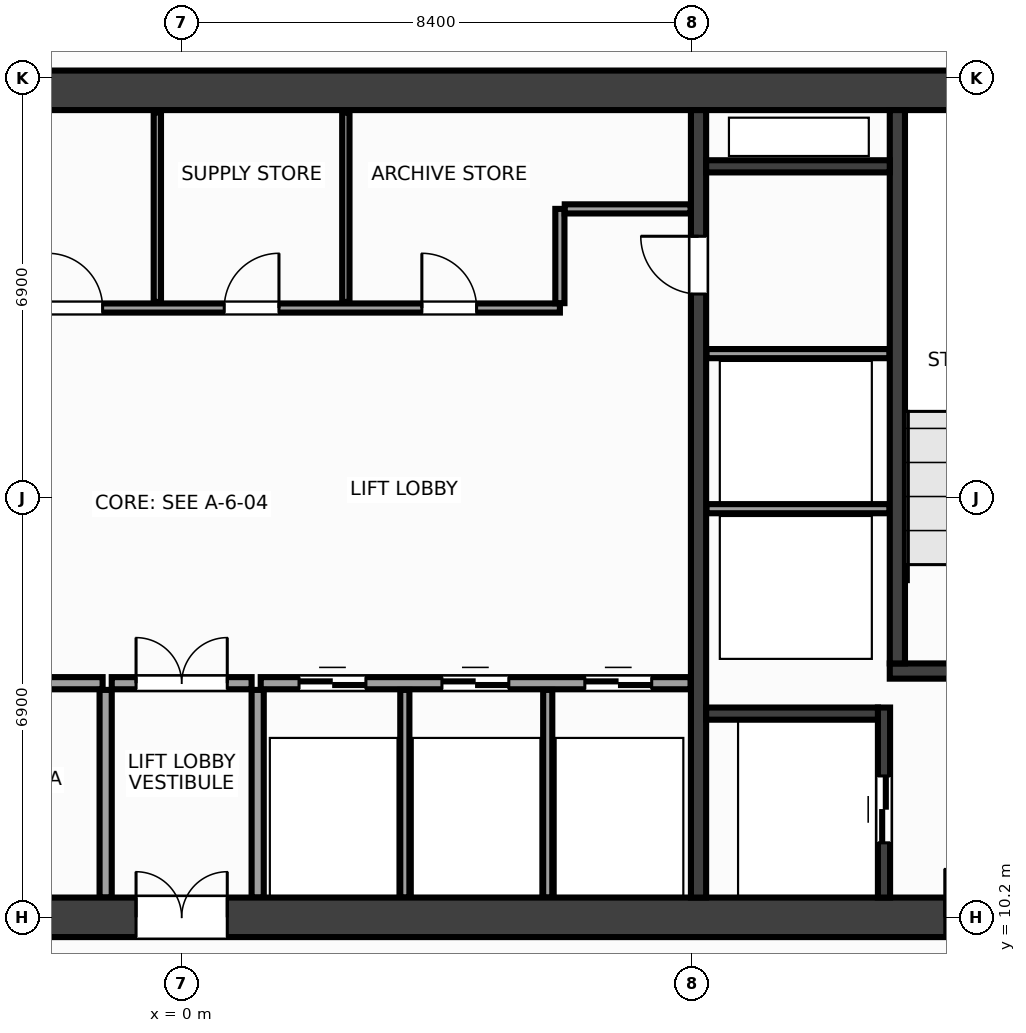
"""IFC4 building model, lengths in metres.
Left out: names, types, materials, properties, quantities, classifications, styles, units other than length and angle.
Written with IfcOpenShell. Run it as: python <this file> out.ifc"""

import sys

from ifc_helpers import new_model, si_unit, direction, frame, frame_2d, origin, place, context, subcontext, project, spatial, rectangle, extrude, source, transform, mapped, element, fill, save


model = new_model("IFC4")
c1 = context("Model", 3, precision=1e-05, world=origin(), true_north=direction((0.0, 1.0)))
c2 = subcontext(c1, "Body", "Model", "MODEL_VIEW")
j1 = project(units=[si_unit("LENGTHUNIT", "METRE"), si_unit("PLANEANGLEUNIT", "RADIAN")], contexts=[c1])
p1 = place(None, origin())
s1 = spatial("IfcSite", under=j1, at=p1, CompositionType="ELEMENT")
p2 = place(p1, origin())
s2 = spatial("IfcBuilding", under=s1, at=p2, CompositionType="ELEMENT")
p3 = place(p2, frame((0.0, 0.0, 92.0)))
s3 = spatial("IfcBuildingStorey", under=s2, at=p3, CompositionType="ELEMENT", Elevation=92.0)
m1 = source(origin(), c2, "Body", "SweptSolid", [
    extrude(rectangle(XDim=31.85, YDim=0.65, at=frame_2d((15.925, 0.0))), origin(), (0.0, 0.0, 1.0), 3.6),
])
p4 = place(p3, frame((-15.925, 23.8, 0.0), z_axis=(0.0, 0.0, 1.0), x_axis=(1.0, 0.0, 0.0)))
e1 = element("IfcWall", 1, at=p4, inside=s3, PredefinedType="SHEAR", context=c2, shape_type="MappedRepresentation", body=[
    mapped(m1, transform((0.0, 0.0, 0.0), x_axis=(1.0, 0.0, 0.0), y_axis=(0.0, 1.0, 0.0), z_axis=(0.0, 0.0, 1.0), scale=1.0)),
])
p5 = place(p3, frame((-15.925, 10.2, 0.0), z_axis=(0.0, 0.0, 1.0), x_axis=(1.0, 0.0, 0.0)))
e2 = element("IfcWall", 2, at=p5, inside=s3, PredefinedType="SHEAR", context=c2, shape_type="MappedRepresentation", body=[
    mapped(m1, transform((0.0, 0.0, 0.0), x_axis=(1.0, 0.0, 0.0), y_axis=(0.0, 1.0, 0.0), z_axis=(0.0, 0.0, 1.0), scale=1.0)),
])
p6 = place(p5, frame((1.775, 0.0, 0.0)))
e3 = element("IfcOpeningElement", 3, at=p6, cuts=e2, PredefinedType="OPENING", context=c2, shape_type="SweptSolid", body=[
    extrude(rectangle(XDim=1.6, YDim=2.15, at=frame_2d((0.8, 1.075))), frame((0.0, 0.337, 0.0), z_axis=(0.0, -1.0, 0.0), x_axis=(1.0, 0.0, 0.0)), (0.0, 0.0, 1.0), 0.674),
])
p7 = place(p5, frame((28.475, 0.0, 0.0)))
e4 = element("IfcOpeningElement", 4, at=p7, cuts=e2, PredefinedType="OPENING", context=c2, shape_type="SweptSolid", body=[
    extrude(rectangle(XDim=1.6, YDim=2.15, at=frame_2d((0.8, 1.075))), frame((0.0, 0.337, 0.0), z_axis=(0.0, -1.0, 0.0), x_axis=(1.0, 0.0, 0.0)), (0.0, 0.0, 1.0), 0.674),
])
p8 = place(p5, frame((15.175, 0.0, 0.0)))
e5 = element("IfcOpeningElement", 5, at=p8, cuts=e2, PredefinedType="OPENING", context=c2, shape_type="SweptSolid", body=[
    extrude(rectangle(XDim=1.5, YDim=2.2, at=frame_2d((0.75, 1.1))), frame((0.0, 0.337, 0.0), z_axis=(0.0, -1.0, 0.0), x_axis=(1.0, 0.0, 0.0)), (0.0, 0.0, 1.0), 0.674),
])
m2 = source(origin(), c2, "Body", "SweptSolid", [
    extrude(rectangle(XDim=12.95, YDim=0.25, at=frame_2d((6.475, 0.0))), origin(), (0.0, 0.0, 1.0), 3.6),
])
p9 = place(p3, frame((8.5, 10.525, 0.0), z_axis=(0.0, 0.0, 1.0), x_axis=(0.0, 1.0, 0.0)))
e6 = element("IfcWall", 6, at=p9, inside=s3, PredefinedType="SHEAR", context=c2, shape_type="MappedRepresentation", body=[
    mapped(m2, transform((0.0, 0.0, 0.0), x_axis=(1.0, 0.0, 0.0), y_axis=(0.0, 1.0, 0.0), z_axis=(0.0, 0.0, 1.0), scale=1.0)),
])
p10 = place(p9, frame((9.925, 0.0, 0.0)))
e7 = element("IfcOpeningElement", 7, at=p10, cuts=e6, PredefinedType="OPENING", context=c2, shape_type="SweptSolid", body=[
    extrude(rectangle(XDim=0.95, YDim=2.15, at=frame_2d((0.475, 1.075))), frame((0.0, 0.137, 0.0), z_axis=(0.0, -1.0, 0.0), x_axis=(1.0, 0.0, 0.0)), (0.0, 0.0, 1.0), 0.274),
])
m3 = source(origin(), c2, "Body", "SweptSolid", [
    extrude(rectangle(XDim=3.63, YDim=0.25, at=frame_2d((1.815, 0.0))), origin(), (0.0, 0.0, 1.0), 3.6),
])
p11 = place(p3, frame((11.645, 14.25, 0.0), z_axis=(0.0, 0.0, 1.0), x_axis=(1.0, 0.0, 0.0)))
e8 = element("IfcWall", 8, at=p11, inside=s3, PredefinedType="SHEAR", context=c2, shape_type="MappedRepresentation", body=[
    mapped(m3, transform((0.0, 0.0, 0.0), x_axis=(1.0, 0.0, 0.0), y_axis=(0.0, 1.0, 0.0), z_axis=(0.0, 0.0, 1.0), scale=1.0)),
])
p12 = place(p11, frame((0.95, 0.0, 0.0)))
e9 = element("IfcOpeningElement", 9, at=p12, cuts=e8, PredefinedType="OPENING", context=c2, shape_type="SweptSolid", body=[
    extrude(rectangle(XDim=1.6, YDim=2.15, at=frame_2d((0.8, 1.075))), frame((0.0, 0.137, 0.0), z_axis=(0.0, -1.0, 0.0), x_axis=(1.0, 0.0, 0.0)), (0.0, 0.0, 1.0), 0.274),
])
m4 = source(origin(), c2, "Body", "SweptSolid", [
    extrude(rectangle(XDim=9.1, YDim=0.25, at=frame_2d((4.55, 0.0))), origin(), (0.0, 0.0, 1.0), 3.6),
])
p13 = place(p3, frame((11.77, 14.375, 0.0), z_axis=(0.0, 0.0, 1.0), x_axis=(0.0, 1.0, 0.0)))
e10 = element("IfcWall", 10, at=p13, inside=s3, PredefinedType="SHEAR", context=c2, shape_type="MappedRepresentation", body=[
    mapped(m4, transform((0.0, 0.0, 0.0), x_axis=(1.0, 0.0, 0.0), y_axis=(0.0, 1.0, 0.0), z_axis=(0.0, 0.0, 1.0), scale=1.0)),
])
m5 = source(origin(), c2, "Body", "SweptSolid", [
    extrude(rectangle(XDim=3.125, YDim=0.2, at=frame_2d((1.562, 0.0))), origin(), (0.0, 0.0, 1.0), 3.6),
])
p14 = place(p3, frame((11.55, 10.525, 0.0), z_axis=(0.0, 0.0, 1.0), x_axis=(0.0, 1.0, 0.0)))
e11 = element("IfcWall", 11, at=p14, inside=s3, PredefinedType="SHEAR", context=c2, shape_type="MappedRepresentation", body=[
    mapped(m5, transform((0.0, 0.0, 0.0), x_axis=(1.0, 0.0, 0.0), y_axis=(0.0, 1.0, 0.0), z_axis=(0.0, 0.0, 1.0), scale=1.0)),
])
p15 = place(p14, frame((0.9, 0.0, 0.0)))
e12 = element("IfcOpeningElement", 12, at=p15, cuts=e11, PredefinedType="OPENING", context=c2, shape_type="SweptSolid", body=[
    extrude(rectangle(XDim=1.1, YDim=2.15, at=frame_2d((0.55, 1.075))), frame((0.0, 0.112, 0.0), z_axis=(0.0, -1.0, 0.0), x_axis=(1.0, 0.0, 0.0)), (0.0, 0.0, 1.0), 0.224),
])
m6 = source(origin(), c2, "Body", "SweptSolid", [
    extrude(rectangle(XDim=2.825, YDim=0.2, at=frame_2d((1.413, 0.0))), origin(), (0.0, 0.0, 1.0), 3.6),
])
p16 = place(p3, frame((8.625, 13.55, 0.0), z_axis=(0.0, 0.0, 1.0), x_axis=(1.0, 0.0, 0.0)))
e13 = element("IfcWall", 13, at=p16, inside=s3, PredefinedType="SHEAR", context=c2, shape_type="MappedRepresentation", body=[
    mapped(m6, transform((0.0, 0.0, 0.0), x_axis=(1.0, 0.0, 0.0), y_axis=(0.0, 1.0, 0.0), z_axis=(0.0, 0.0, 1.0), scale=1.0)),
])
m7 = source(origin(), c2, "Body", "SweptSolid", [
    extrude(rectangle(XDim=3.02, YDim=0.2, at=frame_2d((1.51, 0.0))), origin(), (0.0, 0.0, 1.0), 3.6),
])
p17 = place(p3, frame((8.625, 22.55, 0.0), z_axis=(0.0, 0.0, 1.0), x_axis=(1.0, 0.0, 0.0)))
e14 = element("IfcWall", 14, at=p17, inside=s3, PredefinedType="SHEAR", context=c2, shape_type="MappedRepresentation", body=[
    mapped(m7, transform((0.0, 0.0, 0.0), x_axis=(1.0, 0.0, 0.0), y_axis=(0.0, 1.0, 0.0), z_axis=(0.0, 0.0, 1.0), scale=1.0)),
])
m8 = source(origin(), c2, "Body", "SweptSolid", [
    extrude(rectangle(XDim=3.01, YDim=0.15, at=frame_2d((1.505, 0.0))), origin(), (0.0, 0.0, 1.0), 3.36),
])
for number, where, z_axis, x_axis in (
    (15, (8.63, 16.92, 0.0), (0.0, 0.0, 1.0), (1.0, 0.0, 0.0)),
    (16, (8.63, 19.47, 0.0), (0.0, 0.0, 1.0), (1.0, 0.0, 0.0)),
):
    element("IfcWall", number, at=place(p3, frame(where, z_axis=z_axis, x_axis=x_axis)), inside=s3, PredefinedType="PARTITIONING", context=c2, shape_type="MappedRepresentation", body=[
        mapped(m8, transform((0.0, 0.0, 0.0), x_axis=(1.0, 0.0, 0.0), y_axis=(0.0, 1.0, 0.0), z_axis=(0.0, 0.0, 1.0), scale=1.0)),
    ])
m9 = source(origin(), c2, "Body", "SweptSolid", [
    extrude(rectangle(XDim=7.07, YDim=0.2, at=frame_2d((3.535, 0.0))), origin(), (0.0, 0.0, 1.0), 3.36),
])
p18 = place(p3, frame((-8.37, 14.05, 0.0), z_axis=(0.0, 0.0, 1.0), x_axis=(1.0, 0.0, 0.0)))
e17 = element("IfcWall", 17, at=p18, inside=s3, PredefinedType="PARTITIONING", context=c2, shape_type="MappedRepresentation", body=[
    mapped(m9, transform((0.0, 0.0, 0.0), x_axis=(1.0, 0.0, 0.0), y_axis=(0.0, 1.0, 0.0), z_axis=(0.0, 0.0, 1.0), scale=1.0)),
])
p19 = place(p18, frame((1.06, 0.0, 0.0)))
e18 = element("IfcOpeningElement", 18, at=p19, cuts=e17, PredefinedType="OPENING", context=c2, shape_type="SweptSolid", body=[
    extrude(rectangle(XDim=0.9, YDim=2.15, at=frame_2d((0.45, 1.075))), frame((0.0, 0.112, 0.0), z_axis=(0.0, -1.0, 0.0), x_axis=(1.0, 0.0, 0.0)), (0.0, 0.0, 1.0), 0.224),
])
p20 = place(p18, frame((4.51, 0.0, 0.0)))
e19 = element("IfcOpeningElement", 19, at=p20, cuts=e17, PredefinedType="OPENING", context=c2, shape_type="SweptSolid", body=[
    extrude(rectangle(XDim=0.9, YDim=2.15, at=frame_2d((0.45, 1.075))), frame((0.0, 0.112, 0.0), z_axis=(0.0, -1.0, 0.0), x_axis=(1.0, 0.0, 0.0)), (0.0, 0.0, 1.0), 0.224),
])
p21 = place(p3, frame((1.3, 14.05, 0.0), z_axis=(0.0, 0.0, 1.0), x_axis=(1.0, 0.0, 0.0)))
e20 = element("IfcWall", 20, at=p21, inside=s3, PredefinedType="PARTITIONING", context=c2, shape_type="MappedRepresentation", body=[
    mapped(m9, transform((0.0, 0.0, 0.0), x_axis=(1.0, 0.0, 0.0), y_axis=(0.0, 1.0, 0.0), z_axis=(0.0, 0.0, 1.0), scale=1.0)),
])
p22 = place(p21, frame((0.63, 0.0, 0.0)))
e21 = element("IfcOpeningElement", 21, at=p22, cuts=e20, PredefinedType="OPENING", context=c2, shape_type="SweptSolid", body=[
    extrude(rectangle(XDim=1.1, YDim=2.15, at=frame_2d((0.55, 1.075))), frame((0.0, 0.112, 0.0), z_axis=(0.0, -1.0, 0.0), x_axis=(1.0, 0.0, 0.0)), (0.0, 0.0, 1.0), 0.224),
])
p23 = place(p21, frame((2.98, 0.0, 0.0)))
e22 = element("IfcOpeningElement", 22, at=p23, cuts=e20, PredefinedType="OPENING", context=c2, shape_type="SweptSolid", body=[
    extrude(rectangle(XDim=1.1, YDim=2.15, at=frame_2d((0.55, 1.075))), frame((0.0, 0.112, 0.0), z_axis=(0.0, -1.0, 0.0), x_axis=(1.0, 0.0, 0.0)), (0.0, 0.0, 1.0), 0.224),
])
p24 = place(p21, frame((5.33, 0.0, 0.0)))
e23 = element("IfcOpeningElement", 23, at=p24, cuts=e20, PredefinedType="OPENING", context=c2, shape_type="SweptSolid", body=[
    extrude(rectangle(XDim=1.1, YDim=2.15, at=frame_2d((0.55, 1.075))), frame((0.0, 0.112, 0.0), z_axis=(0.0, -1.0, 0.0), x_axis=(1.0, 0.0, 0.0)), (0.0, 0.0, 1.0), 0.224),
])
m10 = source(origin(), c2, "Body", "SweptSolid", [
    extrude(rectangle(XDim=3.415, YDim=0.2, at=frame_2d((1.708, 0.0))), origin(), (0.0, 0.0, 1.0), 3.36),
])
for number, where, z_axis, x_axis in (
    (24, (-1.25, 10.525, 0.0), (0.0, 0.0, 1.0), (0.0, 1.0, 0.0)),
    (25, (1.25, 10.525, 0.0), (0.0, 0.0, 1.0), (0.0, 1.0, 0.0)),
):
    element("IfcWall", number, at=place(p3, frame(where, z_axis=z_axis, x_axis=x_axis)), inside=s3, PredefinedType="PARTITIONING", context=c2, shape_type="MappedRepresentation", body=[
        mapped(m10, transform((0.0, 0.0, 0.0), x_axis=(1.0, 0.0, 0.0), y_axis=(0.0, 1.0, 0.0), z_axis=(0.0, 0.0, 1.0), scale=1.0)),
    ])
m11 = source(origin(), c2, "Body", "SweptSolid", [
    extrude(rectangle(XDim=2.3, YDim=0.2, at=frame_2d((1.15, 0.0))), origin(), (0.0, 0.0, 1.0), 3.36),
])
p25 = place(p3, frame((-1.15, 14.05, 0.0), z_axis=(0.0, 0.0, 1.0), x_axis=(1.0, 0.0, 0.0)))
e26 = element("IfcWall", 26, at=p25, inside=s3, PredefinedType="PARTITIONING", context=c2, shape_type="MappedRepresentation", body=[
    mapped(m11, transform((0.0, 0.0, 0.0), x_axis=(1.0, 0.0, 0.0), y_axis=(0.0, 1.0, 0.0), z_axis=(0.0, 0.0, 1.0), scale=1.0)),
])
p26 = place(p25, frame((0.4, 0.0, 0.0)))
e27 = element("IfcOpeningElement", 27, at=p26, cuts=e26, PredefinedType="OPENING", context=c2, shape_type="SweptSolid", body=[
    extrude(rectangle(XDim=1.5, YDim=2.2, at=frame_2d((0.75, 1.1))), frame((0.0, 0.112, 0.0), z_axis=(0.0, -1.0, 0.0), x_axis=(1.0, 0.0, 0.0)), (0.0, 0.0, 1.0), 0.224),
])
m12 = source(origin(), c2, "Body", "SweptSolid", [
    extrude(rectangle(XDim=14.59, YDim=0.15, at=frame_2d((7.295, 0.0))), origin(), (0.0, 0.0, 1.0), 3.36),
])
p27 = place(p3, frame((-8.37, 20.22, 0.0), z_axis=(0.0, 0.0, 1.0), x_axis=(1.0, 0.0, 0.0)))
e28 = element("IfcWall", 28, at=p27, inside=s3, PredefinedType="PARTITIONING", context=c2, shape_type="MappedRepresentation", body=[
    mapped(m12, transform((0.0, 0.0, 0.0), x_axis=(1.0, 0.0, 0.0), y_axis=(0.0, 1.0, 0.0), z_axis=(0.0, 0.0, 1.0), scale=1.0)),
])
p28 = place(p27, frame((0.86, 0.0, 0.0)))
e29 = element("IfcOpeningElement", 29, at=p28, cuts=e28, PredefinedType="OPENING", context=c2, shape_type="SweptSolid", body=[
    extrude(rectangle(XDim=0.9, YDim=2.15, at=frame_2d((0.45, 1.075))), frame((0.0, 0.087, 0.0), z_axis=(0.0, -1.0, 0.0), x_axis=(1.0, 0.0, 0.0)), (0.0, 0.0, 1.0), 0.174),
])
p29 = place(p27, frame((3.47, 0.0, 0.0)))
e30 = element("IfcOpeningElement", 30, at=p29, cuts=e28, PredefinedType="OPENING", context=c2, shape_type="SweptSolid", body=[
    extrude(rectangle(XDim=0.9, YDim=2.15, at=frame_2d((0.45, 1.075))), frame((0.0, 0.087, 0.0), z_axis=(0.0, -1.0, 0.0), x_axis=(1.0, 0.0, 0.0)), (0.0, 0.0, 1.0), 0.174),
])
p30 = place(p27, frame((6.17, 0.0, 0.0)))
e31 = element("IfcOpeningElement", 31, at=p30, cuts=e28, PredefinedType="OPENING", context=c2, shape_type="SweptSolid", body=[
    extrude(rectangle(XDim=0.9, YDim=2.15, at=frame_2d((0.45, 1.075))), frame((0.0, 0.087, 0.0), z_axis=(0.0, -1.0, 0.0), x_axis=(1.0, 0.0, 0.0)), (0.0, 0.0, 1.0), 0.174),
])
p31 = place(p27, frame((9.07, 0.0, 0.0)))
e32 = element("IfcOpeningElement", 32, at=p31, cuts=e28, PredefinedType="OPENING", context=c2, shape_type="SweptSolid", body=[
    extrude(rectangle(XDim=0.9, YDim=2.15, at=frame_2d((0.45, 1.075))), frame((0.0, 0.087, 0.0), z_axis=(0.0, -1.0, 0.0), x_axis=(1.0, 0.0, 0.0)), (0.0, 0.0, 1.0), 0.174),
])
p32 = place(p27, frame((12.32, 0.0, 0.0)))
e33 = element("IfcOpeningElement", 33, at=p32, cuts=e28, PredefinedType="OPENING", context=c2, shape_type="SweptSolid", body=[
    extrude(rectangle(XDim=0.9, YDim=2.15, at=frame_2d((0.45, 1.075))), frame((0.0, 0.087, 0.0), z_axis=(0.0, -1.0, 0.0), x_axis=(1.0, 0.0, 0.0)), (0.0, 0.0, 1.0), 0.174),
])
m13 = source(origin(), c2, "Body", "SweptSolid", [
    extrude(rectangle(XDim=1.55, YDim=0.15, at=frame_2d((0.775, 0.0))), origin(), (0.0, 0.0, 1.0), 3.36),
])
p33 = place(p3, frame((6.22, 20.3, 0.0), z_axis=(0.0, 0.0, 1.0), x_axis=(0.0, 1.0, 0.0)))
e34 = element("IfcWall", 34, at=p33, inside=s3, PredefinedType="PARTITIONING", context=c2, shape_type="MappedRepresentation", body=[
    mapped(m13, transform((0.0, 0.0, 0.0), x_axis=(1.0, 0.0, 0.0), y_axis=(0.0, 1.0, 0.0), z_axis=(0.0, 0.0, 1.0), scale=1.0)),
])
m14 = source(origin(), c2, "Body", "SweptSolid", [
    extrude(rectangle(XDim=2.07, YDim=0.15, at=frame_2d((1.035, 0.0))), origin(), (0.0, 0.0, 1.0), 3.36),
])
p34 = place(p3, frame((6.3, 21.85, 0.0), z_axis=(0.0, 0.0, 1.0), x_axis=(1.0, 0.0, 0.0)))
e35 = element("IfcWall", 35, at=p34, inside=s3, PredefinedType="PARTITIONING", context=c2, shape_type="MappedRepresentation", body=[
    mapped(m14, transform((0.0, 0.0, 0.0), x_axis=(1.0, 0.0, 0.0), y_axis=(0.0, 1.0, 0.0), z_axis=(0.0, 0.0, 1.0), scale=1.0)),
])
m15 = source(origin(), c2, "Body", "SweptSolid", [
    extrude(rectangle(XDim=3.415, YDim=0.15, at=frame_2d((1.708, 0.0))), origin(), (0.0, 0.0, 1.0), 3.36),
])
for number, where, z_axis, x_axis in (
    (36, (3.67, 10.525, 0.0), (0.0, 0.0, 1.0), (0.0, 1.0, 0.0)),
    (37, (6.02, 10.525, 0.0), (0.0, 0.0, 1.0), (0.0, 1.0, 0.0)),
):
    element("IfcWall", number, at=place(p3, frame(where, z_axis=z_axis, x_axis=x_axis)), inside=s3, PredefinedType="PARTITIONING", context=c2, shape_type="MappedRepresentation", body=[
        mapped(m15, transform((0.0, 0.0, 0.0), x_axis=(1.0, 0.0, 0.0), y_axis=(0.0, 1.0, 0.0), z_axis=(0.0, 0.0, 1.0), scale=1.0)),
    ])
m16 = source(origin(), c2, "Body", "SweptSolid", [
    extrude(rectangle(XDim=3.115, YDim=0.12, at=frame_2d((1.558, 0.0))), origin(), (0.0, 0.0, 1.0), 3.36),
])
for number, where, z_axis, x_axis in (
    (38, (-0.4, 20.32, 0.0), (0.0, 0.0, 1.0), (0.0, 1.0, 0.0)),
    (39, (2.7, 20.32, 0.0), (0.0, 0.0, 1.0), (0.0, 1.0, 0.0)),
):
    element("IfcWall", number, at=place(p3, frame(where, z_axis=z_axis, x_axis=x_axis)), inside=s3, PredefinedType="PARTITIONING", context=c2, shape_type="MappedRepresentation", body=[
        mapped(m16, transform((0.0, 0.0, 0.0), x_axis=(1.0, 0.0, 0.0), y_axis=(0.0, 1.0, 0.0), z_axis=(0.0, 0.0, 1.0), scale=1.0)),
    ])
m17 = source(origin(), c2, "Body", "SweptSolid", [
    extrude(rectangle(XDim=1.6, YDim=2.15, at=frame_2d((0.8, 1.075))), frame((0.0, 0.025, 0.0), z_axis=(0.0, -1.0, 0.0), x_axis=(1.0, 0.0, 0.0)), (0.0, 0.0, 1.0), 0.05),
])
p35 = place(p7, origin())
e40 = element("IfcDoor", 40, at=p35, inside=s3, OperationType="DOUBLE_DOOR_SINGLE_SWING", PredefinedType="DOOR", context=c2, shape_type="MappedRepresentation", body=[
    mapped(m17, transform((0.0, 0.0, 0.0), x_axis=(1.0, 0.0, 0.0), y_axis=(0.0, 1.0, 0.0), z_axis=(0.0, 0.0, 1.0), scale=1.0)),
])
fill(e4, e40)
m18 = source(origin(), c2, "Body", "SweptSolid", [
    extrude(rectangle(XDim=1.1, YDim=2.15, at=frame_2d((0.55, 1.075))), frame((0.0, 0.025, 0.0), z_axis=(0.0, -1.0, 0.0), x_axis=(1.0, 0.0, 0.0)), (0.0, 0.0, 1.0), 0.05),
])
p36 = place(p15, origin())
e41 = element("IfcDoor", 41, at=p36, inside=s3, OperationType="DOUBLE_DOOR_SLIDING", PredefinedType="DOOR", context=c2, shape_type="MappedRepresentation", body=[
    mapped(m18, transform((0.0, 0.0, 0.0), x_axis=(1.0, 0.0, 0.0), y_axis=(0.0, 1.0, 0.0), z_axis=(0.0, 0.0, 1.0), scale=1.0)),
])
fill(e12, e41)
m19 = source(origin(), c2, "Body", "SweptSolid", [
    extrude(rectangle(XDim=0.95, YDim=2.15, at=frame_2d((0.475, 1.075))), frame((0.0, 0.025, 0.0), z_axis=(0.0, -1.0, 0.0), x_axis=(1.0, 0.0, 0.0)), (0.0, 0.0, 1.0), 0.05),
])
p37 = place(p10, origin())
e42 = element("IfcDoor", 42, at=p37, inside=s3, OperationType="SINGLE_SWING_RIGHT", PredefinedType="DOOR", context=c2, shape_type="MappedRepresentation", body=[
    mapped(m19, transform((0.0, 0.0, 0.0), x_axis=(1.0, 0.0, 0.0), y_axis=(0.0, 1.0, 0.0), z_axis=(0.0, 0.0, 1.0), scale=1.0)),
])
fill(e7, e42)
p38 = place(p22, origin())
e43 = element("IfcDoor", 43, at=p38, inside=s3, OperationType="DOUBLE_DOOR_SLIDING", PredefinedType="DOOR", context=c2, shape_type="MappedRepresentation", body=[
    mapped(m18, transform((0.0, 0.0, 0.0), x_axis=(1.0, 0.0, 0.0), y_axis=(0.0, 1.0, 0.0), z_axis=(0.0, 0.0, 1.0), scale=1.0)),
])
fill(e21, e43)
p39 = place(p23, origin())
e44 = element("IfcDoor", 44, at=p39, inside=s3, OperationType="DOUBLE_DOOR_SLIDING", PredefinedType="DOOR", context=c2, shape_type="MappedRepresentation", body=[
    mapped(m18, transform((0.0, 0.0, 0.0), x_axis=(1.0, 0.0, 0.0), y_axis=(0.0, 1.0, 0.0), z_axis=(0.0, 0.0, 1.0), scale=1.0)),
])
fill(e22, e44)
p40 = place(p24, origin())
e45 = element("IfcDoor", 45, at=p40, inside=s3, OperationType="DOUBLE_DOOR_SLIDING", PredefinedType="DOOR", context=c2, shape_type="MappedRepresentation", body=[
    mapped(m18, transform((0.0, 0.0, 0.0), x_axis=(1.0, 0.0, 0.0), y_axis=(0.0, 1.0, 0.0), z_axis=(0.0, 0.0, 1.0), scale=1.0)),
])
fill(e23, e45)
m20 = source(origin(), c2, "Body", "SweptSolid", [
    extrude(rectangle(XDim=1.5, YDim=2.2, at=frame_2d((0.75, 1.1))), frame((0.0, 0.025, 0.0), z_axis=(0.0, -1.0, 0.0), x_axis=(1.0, 0.0, 0.0)), (0.0, 0.0, 1.0), 0.05),
])
p41 = place(p26, origin())
e46 = element("IfcDoor", 46, at=p41, inside=s3, OperationType="DOUBLE_DOOR_SINGLE_SWING", PredefinedType="DOOR", context=c2, shape_type="MappedRepresentation", body=[
    mapped(m20, transform((0.0, 0.0, 0.0), x_axis=(1.0, 0.0, 0.0), y_axis=(0.0, 1.0, 0.0), z_axis=(0.0, 0.0, 1.0), scale=1.0)),
])
fill(e27, e46)
p42 = place(p8, origin())
e47 = element("IfcDoor", 47, at=p42, inside=s3, OperationType="DOUBLE_DOOR_SINGLE_SWING", PredefinedType="DOOR", context=c2, shape_type="MappedRepresentation", body=[
    mapped(m20, transform((0.0, 0.0, 0.0), x_axis=(1.0, 0.0, 0.0), y_axis=(0.0, 1.0, 0.0), z_axis=(0.0, 0.0, 1.0), scale=1.0)),
])
fill(e5, e47)
m21 = source(origin(), c2, "Body", "SweptSolid", [
    extrude(rectangle(XDim=0.9, YDim=2.15, at=frame_2d((0.45, 1.075))), frame((0.0, 0.025, 0.0), z_axis=(0.0, -1.0, 0.0), x_axis=(1.0, 0.0, 0.0)), (0.0, 0.0, 1.0), 0.05),
])
p43 = place(p30, origin())
e48 = element("IfcDoor", 48, at=p43, inside=s3, OperationType="SINGLE_SWING_LEFT", PredefinedType="DOOR", context=c2, shape_type="MappedRepresentation", body=[
    mapped(m21, transform((0.0, 0.0, 0.0), x_axis=(1.0, 0.0, 0.0), y_axis=(0.0, 1.0, 0.0), z_axis=(0.0, 0.0, 1.0), scale=1.0)),
])
fill(e31, e48)
p44 = place(p31, origin())
e49 = element("IfcDoor", 49, at=p44, inside=s3, OperationType="SINGLE_SWING_RIGHT", PredefinedType="DOOR", context=c2, shape_type="MappedRepresentation", body=[
    mapped(m21, transform((0.0, 0.0, 0.0), x_axis=(1.0, 0.0, 0.0), y_axis=(0.0, 1.0, 0.0), z_axis=(0.0, 0.0, 1.0), scale=1.0)),
])
fill(e32, e49)
p45 = place(p32, origin())
e50 = element("IfcDoor", 50, at=p45, inside=s3, OperationType="SINGLE_SWING_LEFT", PredefinedType="DOOR", context=c2, shape_type="MappedRepresentation", body=[
    mapped(m21, transform((0.0, 0.0, 0.0), x_axis=(1.0, 0.0, 0.0), y_axis=(0.0, 1.0, 0.0), z_axis=(0.0, 0.0, 1.0), scale=1.0)),
])
fill(e33, e50)
save(model, sys.argv[1])
